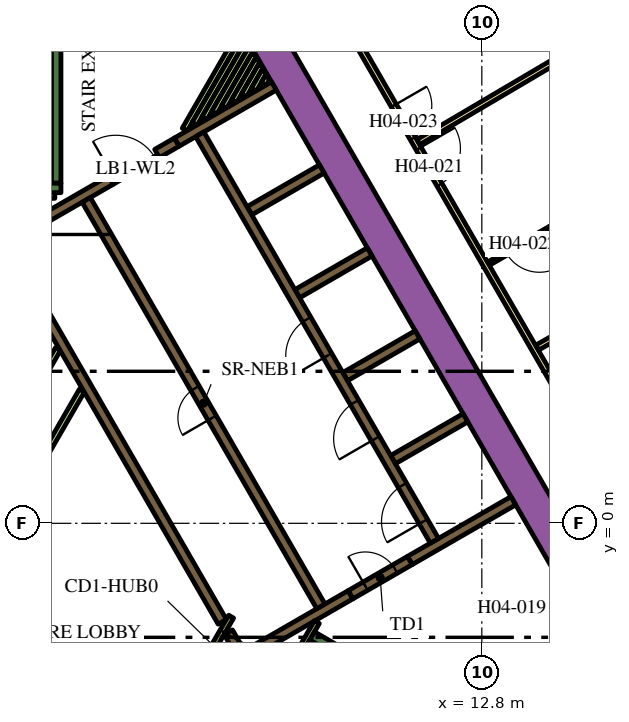
"""IFC4 building model, lengths in metres.
Left out: names, types, materials, properties, quantities, classifications, styles, units other than length and angle.
Written with IfcOpenShell. Run it as: python <this file> out.ifc"""

import sys

from ifc_helpers import new_model, si_unit, direction, frame, frame_2d, origin, place, context, subcontext, project, spatial, rectangle, extrude, element, fill, save


model = new_model("IFC4")
c1 = context("Model", 3, precision=1e-05, world=origin(), true_north=direction((0.0, 1.0)))
c2 = subcontext(c1, "Body", "Model", "MODEL_VIEW")
j1 = project(units=[si_unit("LENGTHUNIT", "METRE"), si_unit("PLANEANGLEUNIT", "RADIAN")], contexts=[c1])
p1 = place(None, origin())
s1 = spatial("IfcSite", under=j1, at=p1, CompositionType="ELEMENT")
p2 = place(p1, origin())
s2 = spatial("IfcBuilding", under=s1, at=p2, CompositionType="ELEMENT")
p3 = place(p2, frame((0.0, 0.0, 70.5)))
s3 = spatial("IfcBuildingStorey", under=s2, at=p3, CompositionType="ELEMENT", Elevation=70.5)
p4 = place(p3, frame((6.461, 13.909, 0.0), z_axis=(0.0, 0.0, 1.0), x_axis=(0.500005804227, -0.866022052686, 0.0)))
e1 = element("IfcWall", 1, at=p4, inside=s3, PredefinedType="SOLIDWALL", context=c2, shape_type="SweptSolid", body=[
    extrude(rectangle(XDim=20.834, YDim=0.9, at=frame_2d((10.417, 0.0))), origin(), (0.0, 0.0, 1.0), 3.9),
])
p5 = place(p3, frame((8.334, -2.964, 0.0), z_axis=(0.0, 0.0, 1.0), x_axis=(0.866016039709, -0.500016218704, 0.0)))
e2 = element("IfcWall", 2, at=p5, inside=s3, PredefinedType="SOLIDWALL", context=c2, shape_type="SweptSolid", body=[
    extrude(rectangle(XDim=7.05, YDim=0.25, at=frame_2d((3.525, 0.0))), origin(), (0.0, 0.0, 1.0), 3.9),
])
p6 = place(p3, frame((8.168, -3.503, 0.0), z_axis=(0.0, 0.0, 1.0), x_axis=(0.49972245349, 0.866185586049, 0.0)))
e3 = element("IfcWall", 3, at=p6, inside=s3, PredefinedType="SOLIDWALL", context=c2, shape_type="SweptSolid", body=[
    extrude(rectangle(XDim=0.425, YDim=0.25, at=frame_2d((0.212, 0.0))), origin(), (0.0, 0.0, 1.0), 3.9),
])
p7 = place(p3, frame((1.6, 8.95, 0.0), z_axis=(0.0, 0.0, 1.0), x_axis=(0.0, 1.0, 0.0)))
e4 = element("IfcWall", 4, at=p7, inside=s3, PredefinedType="SOLIDWALL", context=c2, shape_type="SweptSolid", body=[
    extrude(rectangle(XDim=6.8, YDim=0.25, at=frame_2d((3.4, 0.0))), origin(), (0.0, 0.0, 1.0), 3.9),
])
p8 = place(p3, frame((1.05, 8.825, 0.0), z_axis=(0.0, 0.0, 1.0), x_axis=(1.0, 0.0, 0.0)))
e5 = element("IfcWall", 5, at=p8, inside=s3, PredefinedType="SOLIDWALL", context=c2, shape_type="SweptSolid", body=[
    extrude(rectangle(XDim=0.675, YDim=0.25, at=frame_2d((0.337, 0.0))), origin(), (0.0, 0.0, 1.0), 3.9),
])
p9 = place(p3, frame((10.464, 1.677, 0.0), z_axis=(0.0, 0.0, 1.0), x_axis=(0.86605622881, 0.499946605688, 0.0)))
e6 = element("IfcWall", 6, at=p9, inside=s3, PredefinedType="SOLIDWALL", context=c2, shape_type="SweptSolid", body=[
    extrude(rectangle(XDim=2.2, YDim=0.25, at=frame_2d((1.1, 0.0))), origin(), (0.0, 0.0, 1.0), 3.9),
])
p10 = place(p3, frame((13.629, 0.594, 0.0), z_axis=(0.0, 0.0, 1.0), x_axis=(-0.86602790099, -0.499995674689, 0.0)))
e7 = element("IfcWall", 7, at=p10, inside=s3, PredefinedType="SOLIDWALL", context=c2, shape_type="SweptSolid", body=[
    extrude(rectangle(XDim=3.146, YDim=0.25, at=frame_2d((1.573, 0.0))), origin(), (0.0, 0.0, 1.0), 3.9),
])
p11 = place(p3, frame((9.346, -1.879, 0.0), z_axis=(0.0, 0.0, 1.0), x_axis=(-0.866048528039, -0.499959945477, 0.0)))
e8 = element("IfcWall", 8, at=p11, inside=s3, PredefinedType="SOLIDWALL", context=c2, shape_type="SweptSolid", body=[
    extrude(rectangle(XDim=3.47, YDim=0.25, at=frame_2d((1.735, 0.0))), origin(), (0.0, 0.0, 1.0), 3.9),
])
p12 = place(p3, frame((6.13, -2.867, 0.0), z_axis=(0.0, 0.0, 1.0), x_axis=(0.500160776593, -0.865932559475, 0.0)))
e9 = element("IfcWall", 9, at=p12, inside=s3, PredefinedType="SOLIDWALL", context=c2, shape_type="SweptSolid", body=[
    extrude(rectangle(XDim=0.627, YDim=0.25, at=frame_2d((0.313, 0.0))), origin(), (0.0, 0.0, 1.0), 3.9),
])
for number, where, z_axis, x_axis in (
    (10, (9.204, 3.859, 0.0), (0.0, 0.0, 1.0), (0.866, 0.5, 0.0)),
    (11, (7.944, 6.041, 0.0), (0.0, 0.0, 1.0), (0.866, 0.5, 0.0)),
    (12, (6.684, 8.224, 0.0), (0.0, 0.0, 1.0), (0.866, 0.5, 0.0)),
):
    element("IfcWall", number, at=place(p3, frame(where, z_axis=z_axis, x_axis=x_axis)), inside=s3, PredefinedType="SOLIDWALL", context=c2, shape_type="SweptSolid", body=[
        extrude(rectangle(XDim=2.2, YDim=0.25, at=frame_2d((1.1, 0.0))), origin(), (0.0, 0.0, 1.0), 3.9),
    ])
p13 = place(p3, frame((4.254, 9.731, 0.0), z_axis=(0.0, 0.0, 1.0), x_axis=(0.866056883327, 0.499945471869, 0.0)))
e13 = element("IfcWall", 13, at=p13, inside=s3, PredefinedType="SOLIDWALL", context=c2, shape_type="SweptSolid", body=[
    extrude(rectangle(XDim=0.6, YDim=0.25, at=frame_2d((0.3, 0.0))), origin(), (0.0, 0.0, 1.0), 3.9),
])
p14 = place(p3, frame((4.776, 10.032, 0.0), z_axis=(0.0, 0.0, 1.0), x_axis=(0.86600215702, 0.500040262416, 0.0)))
e14 = element("IfcWall", 14, at=p14, inside=s3, PredefinedType="SOLIDWALL", context=c2, shape_type="SweptSolid", body=[
    extrude(rectangle(XDim=2.948, YDim=0.25, at=frame_2d((1.474, 0.0))), origin(), (0.0, 0.0, 1.0), 3.9),
])
p15 = place(p3, frame((0.098, 7.331, 0.0), z_axis=(0.0, 0.0, 1.0), x_axis=(0.865988154826, 0.50006451154, 0.0)))
e15 = element("IfcWall", 15, at=p15, inside=s3, PredefinedType="SOLIDWALL", context=c2, shape_type="SweptSolid", body=[
    extrude(rectangle(XDim=3.398, YDim=0.25, at=frame_2d((1.699, 0.0))), origin(), (0.0, 0.0, 1.0), 3.9),
])
p16 = place(p3, frame((5.97, -2.591, 0.0), z_axis=(0.0, 0.0, 1.0), x_axis=(-0.499994469932, 0.866028596547, 0.0)))
e16 = element("IfcWall", 16, at=p16, inside=s3, PredefinedType="SOLIDWALL", context=c2, shape_type="SweptSolid", body=[
    extrude(rectangle(XDim=10.488, YDim=0.25, at=frame_2d((5.244, 0.0))), origin(), (0.0, 0.0, 1.0), 3.9),
])
p17 = place(p3, frame((8.459, -2.599, 0.0), z_axis=(0.0, 0.0, 1.0), x_axis=(-0.500041054325, -0.866001699761, 0.0)))
e17 = element("IfcWall", 17, at=p17, inside=s3, PredefinedType="PARTITIONING", context=c2, shape_type="SweptSolid", body=[
    extrude(rectangle(XDim=0.929, YDim=0.15, at=frame_2d((0.464, 0.0))), origin(), (0.0, 0.0, 1.0), 3.9),
])
p18 = place(p3, frame((-1.887, -3.718, 0.0), z_axis=(0.0, 0.0, 1.0), x_axis=(0.500005008002, 0.866022512394, 0.0)))
e18 = element("IfcWall", 18, at=p18, inside=s3, PredefinedType="PARTITIONING", context=c2, shape_type="SweptSolid", body=[
    extrude(rectangle(XDim=8.327, YDim=0.15, at=frame_2d((4.164, 0.0))), origin(), (0.0, 0.0, 1.0), 2.75),
])
p19 = place(p3, frame((-0.3, 1.212, 0.0), z_axis=(0.0, 0.0, 1.0), x_axis=(0.499963101113, 0.866046706318, 0.0)))
e19 = element("IfcWall", 19, at=p19, inside=s3, PredefinedType="PARTITIONING", context=c2, shape_type="SweptSolid", body=[
    extrude(rectangle(XDim=3.893, YDim=0.15, at=frame_2d((1.947, 0.0))), origin(), (0.0, 0.0, 1.0), 2.75),
])
p20 = place(p3, frame((1.05, 8.625, 0.0), z_axis=(0.0, 0.0, 1.0), x_axis=(1.0, 0.0, 0.0)))
e20 = element("IfcWall", 20, at=p20, inside=s3, PredefinedType="PARTITIONING", context=c2, shape_type="SweptSolid", body=[
    extrude(rectangle(XDim=0.514, YDim=0.15, at=frame_2d((0.257, 0.0))), origin(), (0.0, 0.0, 1.0), 2.75),
])
p21 = place(p3, frame((4.982, 10.359, 0.0), z_axis=(0.0, 0.0, 1.0), x_axis=(0.500051824031, 0.865995481099, 0.0)))
e21 = element("IfcWall", 21, at=p21, inside=s3, PredefinedType="PARTITIONING", context=c2, shape_type="SweptSolid", body=[
    extrude(rectangle(XDim=2.973, YDim=0.15, at=frame_2d((1.486, 0.0))), origin(), (0.0, 0.0, 1.0), 2.75),
])
p22 = place(p3, frame((5.242, 10.509, 0.0), z_axis=(0.0, 0.0, 1.0), x_axis=(0.499958506883, 0.866049358521, 0.0)))
e22 = element("IfcWall", 22, at=p22, inside=s3, PredefinedType="PARTITIONING", context=c2, shape_type="SweptSolid", body=[
    extrude(rectangle(XDim=2.626, YDim=0.15, at=frame_2d((1.313, 0.0))), origin(), (0.0, 0.0, 1.0), 2.75),
])
p23 = place(p3, frame((5.501, 10.659, 0.0), z_axis=(0.0, 0.0, 1.0), x_axis=(0.499951092774, 0.866053638543, 0.0)))
e23 = element("IfcWall", 23, at=p23, inside=s3, PredefinedType="PARTITIONING", context=c2, shape_type="SweptSolid", body=[
    extrude(rectangle(XDim=2.28, YDim=0.15, at=frame_2d((1.14, 0.0))), origin(), (0.0, 0.0, 1.0), 2.75),
])
p24 = place(p3, frame((5.761, 10.809, 0.0), z_axis=(0.0, 0.0, 1.0), x_axis=(0.499900985997, 0.866082561999, 0.0)))
e24 = element("IfcWall", 24, at=p24, inside=s3, PredefinedType="PARTITIONING", context=c2, shape_type="SweptSolid", body=[
    extrude(rectangle(XDim=1.934, YDim=0.15, at=frame_2d((0.967, 0.0))), origin(), (0.0, 0.0, 1.0), 2.75),
])
p25 = place(p3, frame((6.021, 10.959, 0.0), z_axis=(0.0, 0.0, 1.0), x_axis=(0.499944387978, 0.86605750902, 0.0)))
e25 = element("IfcWall", 25, at=p25, inside=s3, PredefinedType="PARTITIONING", context=c2, shape_type="SweptSolid", body=[
    extrude(rectangle(XDim=1.587, YDim=0.15, at=frame_2d((0.793, 0.0))), origin(), (0.0, 0.0, 1.0), 2.75),
])
p26 = place(p3, frame((6.281, 11.109, 0.0), z_axis=(0.0, 0.0, 1.0), x_axis=(0.500012022864, 0.866018462269, 0.0)))
e26 = element("IfcWall", 26, at=p26, inside=s3, PredefinedType="PARTITIONING", context=c2, shape_type="SweptSolid", body=[
    extrude(rectangle(XDim=1.241, YDim=0.15, at=frame_2d((0.62, 0.0))), origin(), (0.0, 0.0, 1.0), 2.75),
])
p27 = place(p3, frame((6.541, 11.259, 0.0), z_axis=(0.0, 0.0, 1.0), x_axis=(0.500132045864, 0.865949153646, 0.0)))
e27 = element("IfcWall", 27, at=p27, inside=s3, PredefinedType="PARTITIONING", context=c2, shape_type="SweptSolid", body=[
    extrude(rectangle(XDim=0.894, YDim=0.15, at=frame_2d((0.447, 0.0))), origin(), (0.0, 0.0, 1.0), 2.75),
])
p28 = place(p3, frame((6.8, 11.409, 0.0), z_axis=(0.0, 0.0, 1.0), x_axis=(0.500210807569, 0.865903659763, 0.0)))
e28 = element("IfcWall", 28, at=p28, inside=s3, PredefinedType="PARTITIONING", context=c2, shape_type="SweptSolid", body=[
    extrude(rectangle(XDim=0.548, YDim=0.15, at=frame_2d((0.274, 0.0))), origin(), (0.0, 0.0, 1.0), 2.75),
])
p29 = place(p3, frame((7.06, 11.559, 0.0), z_axis=(0.0, 0.0, 1.0), x_axis=(0.499267785915, 0.866447735266, 0.0)))
e29 = element("IfcWall", 29, at=p29, inside=s3, PredefinedType="PARTITIONING", context=c2, shape_type="SweptSolid", body=[
    extrude(rectangle(XDim=0.201, YDim=0.15, at=frame_2d((0.101, 0.0))), origin(), (0.0, 0.0, 1.0), 2.75),
])
p30 = place(p3, frame((11.553, -0.46, 0.0), z_axis=(0.0, 0.0, 1.0), x_axis=(-0.500006514828, 0.866021642414, 0.0)))
e30 = element("IfcWall", 30, at=p30, inside=s3, PredefinedType="SOLIDWALL", context=c2, shape_type="SweptSolid", body=[
    extrude(rectangle(XDim=12.35, YDim=0.25, at=frame_2d((6.175, 0.0))), origin(), (0.0, 0.0, 1.0), 3.9),
])
p31 = place(p30, frame((0.585, 0.0, 0.0)))
e31 = element("IfcOpeningElement", 31, at=p31, cuts=e30, PredefinedType="OPENING", context=c2, shape_type="SweptSolid", body=[
    extrude(rectangle(XDim=1.1, YDim=2.1, at=frame_2d((0.55, 1.05))), frame((0.0, 0.135, 0.0), z_axis=(0.0, -1.0, 0.0), x_axis=(1.0, 0.0, 0.0)), (0.0, 0.0, 1.0), 0.27),
])
p32 = place(p30, frame((3.105, 0.0, 0.0)))
e32 = element("IfcOpeningElement", 32, at=p32, cuts=e30, PredefinedType="OPENING", context=c2, shape_type="SweptSolid", body=[
    extrude(rectangle(XDim=1.1, YDim=2.1, at=frame_2d((0.55, 1.05))), frame((0.0, 0.135, 0.0), z_axis=(0.0, -1.0, 0.0), x_axis=(1.0, 0.0, 0.0)), (0.0, 0.0, 1.0), 0.27),
])
p33 = place(p30, frame((5.625, 0.0, 0.0)))
e33 = element("IfcOpeningElement", 33, at=p33, cuts=e30, PredefinedType="OPENING", context=c2, shape_type="SweptSolid", body=[
    extrude(rectangle(XDim=1.1, YDim=2.1, at=frame_2d((0.55, 1.05))), frame((0.0, 0.135, 0.0), z_axis=(0.0, -1.0, 0.0), x_axis=(1.0, 0.0, 0.0)), (0.0, 0.0, 1.0), 0.27),
])
p34 = place(p3, frame((8.565, -2.185, 0.0), z_axis=(0.0, 0.0, 1.0), x_axis=(-0.499997954832, 0.866026584559, 0.0)))
e34 = element("IfcWall", 34, at=p34, inside=s3, PredefinedType="SOLIDWALL", context=c2, shape_type="SweptSolid", body=[
    extrude(rectangle(XDim=12.35, YDim=0.25, at=frame_2d((6.175, 0.0))), origin(), (0.0, 0.0, 1.0), 3.9),
])
p35 = place(p34, frame((5.725, 0.0, 0.0)))
e35 = element("IfcOpeningElement", 35, at=p35, cuts=e34, PredefinedType="OPENING", context=c2, shape_type="SweptSolid", body=[
    extrude(rectangle(XDim=0.9, YDim=2.1, at=frame_2d((0.45, 1.05))), frame((0.0, 0.135, 0.0), z_axis=(0.0, -1.0, 0.0), x_axis=(1.0, 0.0, 0.0)), (0.0, 0.0, 1.0), 0.27),
])
p36 = place(p3, frame((9.346, -1.879, 0.0), z_axis=(0.0, 0.0, 1.0), x_axis=(0.866047807691, 0.499961193289, 0.0)))
e36 = element("IfcWall", 36, at=p36, inside=s3, PredefinedType="SOLIDWALL", context=c2, shape_type="SweptSolid", body=[
    extrude(rectangle(XDim=1.8, YDim=0.25, at=frame_2d((0.9, 0.0))), origin(), (0.0, 0.0, 1.0), 3.9),
])
p37 = place(p36, frame((0.45, 0.0, 0.0)))
e37 = element("IfcOpeningElement", 37, at=p37, cuts=e36, PredefinedType="OPENING", context=c2, shape_type="SweptSolid", body=[
    extrude(rectangle(XDim=0.9, YDim=2.1, at=frame_2d((0.45, 1.05))), frame((0.0, 0.135, 0.0), z_axis=(0.0, -1.0, 0.0), x_axis=(1.0, 0.0, 0.0)), (0.0, 0.0, 1.0), 0.27),
])
p38 = place(p3, frame((6.203, -2.456, 0.0), z_axis=(0.0, 0.0, 1.0), x_axis=(-0.500043961785, -0.866000020948, 0.0)))
e38 = element("IfcWall", 38, at=p38, inside=s3, PredefinedType="PARTITIONING", context=c2, shape_type="SweptSolid", body=[
    extrude(rectangle(XDim=1.95, YDim=0.15, at=frame_2d((0.975, 0.0))), origin(), (0.0, 0.0, 1.0), 3.9),
])
p39 = place(p38, frame((0.45, 0.0, 0.0)))
e39 = element("IfcOpeningElement", 39, at=p39, cuts=e38, PredefinedType="OPENING", context=c2, shape_type="SweptSolid", body=[
    extrude(rectangle(XDim=0.9, YDim=2.1, at=frame_2d((0.45, 1.05))), frame((0.0, 0.085, 0.0), z_axis=(0.0, -1.0, 0.0), x_axis=(1.0, 0.0, 0.0)), (0.0, 0.0, 1.0), 0.17),
])
p40 = place(p3, frame((3.081, 8.961, 0.0), z_axis=(0.0, 0.0, 1.0), x_axis=(0.866034573852, 0.49998411664, 0.0)))
e40 = element("IfcWall", 40, at=p40, inside=s3, PredefinedType="PARTITIONING", context=c2, shape_type="SweptSolid", body=[
    extrude(rectangle(XDim=1.4, YDim=0.09, at=frame_2d((0.7, 0.0))), origin(), (0.0, 0.0, 1.0), 2.75),
])
p41 = place(p40, frame((0.1, 0.0, 0.0)))
e41 = element("IfcOpeningElement", 41, at=p41, cuts=e40, PredefinedType="OPENING", context=c2, shape_type="SweptSolid", body=[
    extrude(rectangle(XDim=1.2, YDim=2.1, at=frame_2d((0.6, 1.05))), frame((0.0, 0.055, 0.0), z_axis=(0.0, -1.0, 0.0), x_axis=(1.0, 0.0, 0.0)), (0.0, 0.0, 1.0), 0.11),
])
p42 = place(p3, frame((6.163, 18.475, 0.0), z_axis=(0.0, 0.0, 1.0), x_axis=(0.500001317485, -0.866024643133, 0.0)))
e42 = element("IfcWall", 42, at=p42, inside=s3, PredefinedType="PARTITIONING", context=c2, shape_type="SweptSolid", body=[
    extrude(rectangle(XDim=25.767, YDim=0.15, at=frame_2d((12.883, 0.0))), origin(), (0.0, 0.0, 1.0), 2.75),
])
p43 = place(p42, frame((21.138, 0.0, 0.0)))
e43 = element("IfcOpeningElement", 43, at=p43, cuts=e42, PredefinedType="OPENING", context=c2, shape_type="SweptSolid", body=[
    extrude(rectangle(XDim=1.0, YDim=2.1, at=frame_2d((0.5, 1.05))), frame((0.0, 0.085, 0.0), z_axis=(0.0, -1.0, 0.0), x_axis=(1.0, 0.0, 0.0)), (0.0, 0.0, 1.0), 0.17),
])
p44 = place(p42, frame((9.948, 0.0, 0.0)))
e44 = element("IfcOpeningElement", 44, at=p44, cuts=e42, PredefinedType="OPENING", context=c2, shape_type="SweptSolid", body=[
    extrude(rectangle(XDim=1.1, YDim=2.1, at=frame_2d((0.55, 1.05))), frame((0.0, 0.085, 0.0), z_axis=(0.0, -1.0, 0.0), x_axis=(1.0, 0.0, 0.0)), (0.0, 0.0, 1.0), 0.17),
])
p45 = place(p42, frame((8.641, 0.0, 0.0)))
e45 = element("IfcOpeningElement", 45, at=p45, cuts=e42, PredefinedType="OPENING", context=c2, shape_type="SweptSolid", body=[
    extrude(rectangle(XDim=1.0, YDim=2.1, at=frame_2d((0.5, 1.05))), frame((0.0, 0.085, 0.0), z_axis=(0.0, -1.0, 0.0), x_axis=(1.0, 0.0, 0.0)), (0.0, 0.0, 1.0), 0.17),
])
p46 = place(p42, frame((0.18, 0.0, 0.0)))
e46 = element("IfcOpeningElement", 46, at=p46, cuts=e42, PredefinedType="OPENING", context=c2, shape_type="SweptSolid", body=[
    extrude(rectangle(XDim=1.0, YDim=2.1, at=frame_2d((0.5, 1.05))), frame((0.0, 0.085, 0.0), z_axis=(0.0, -1.0, 0.0), x_axis=(1.0, 0.0, 0.0)), (0.0, 0.0, 1.0), 0.17),
])
p47 = place(p3, frame((17.856, 13.999, 0.0), z_axis=(0.0, 0.0, 1.0), x_axis=(-0.861371519381, -0.507975497047, 0.0)))
e47 = element("IfcWall", 47, at=p47, inside=s3, PredefinedType="PARTITIONING", context=c2, shape_type="SweptSolid", body=[
    extrude(rectangle(XDim=7.804, YDim=0.15, at=frame_2d((3.902, 0.0))), origin(), (0.0, 0.0, 1.0), 2.75),
])
p48 = place(p3, frame((21.052, 8.464, 0.0), z_axis=(0.0, 0.0, 1.0), x_axis=(-0.87059371954, -0.492002617368, 0.0)))
e48 = element("IfcWall", 48, at=p48, inside=s3, PredefinedType="PARTITIONING", context=c2, shape_type="SweptSolid", body=[
    extrude(rectangle(XDim=7.803, YDim=0.15, at=frame_2d((3.902, 0.0))), origin(), (0.0, 0.0, 1.0), 2.75),
])
p49 = place(p3, frame((15.397, 8.231, 0.0), z_axis=(0.0, 0.0, 1.0), x_axis=(-0.866018616679, -0.500011755427, 0.0)))
e49 = element("IfcWall", 49, at=p49, inside=s3, PredefinedType="PARTITIONING", context=c2, shape_type="SweptSolid", body=[
    extrude(rectangle(XDim=2.8, YDim=0.1, at=frame_2d((1.4, 0.0))), origin(), (0.0, 0.0, 1.0), 2.75),
])
p50 = place(p49, frame((1.25, 0.0, 0.0)))
e50 = element("IfcOpeningElement", 50, at=p50, cuts=e49, PredefinedType="OPENING", context=c2, shape_type="SweptSolid", body=[
    extrude(rectangle(XDim=1.0, YDim=2.1, at=frame_2d((0.5, 1.05))), frame((0.0, 0.06, 0.0), z_axis=(0.0, -1.0, 0.0), x_axis=(1.0, 0.0, 0.0)), (0.0, 0.0, 1.0), 0.12),
])
p51 = place(p31, origin())
e51 = element("IfcDoor", 51, at=p51, inside=s3, OperationType="DOUBLE_DOOR_SLIDING", PredefinedType="DOOR", context=c2, shape_type="SweptSolid", body=[
    extrude(rectangle(XDim=1.1, YDim=2.1, at=frame_2d((0.55, 1.05))), frame((0.0, 0.025, 0.0), z_axis=(0.0, -1.0, 0.0), x_axis=(1.0, 0.0, 0.0)), (0.0, 0.0, 1.0), 0.05),
])
fill(e31, e51)
p52 = place(p32, origin())
e52 = element("IfcDoor", 52, at=p52, inside=s3, OperationType="DOUBLE_DOOR_SLIDING", PredefinedType="DOOR", context=c2, shape_type="SweptSolid", body=[
    extrude(rectangle(XDim=1.1, YDim=2.1, at=frame_2d((0.55, 1.05))), frame((0.0, 0.025, 0.0), z_axis=(0.0, -1.0, 0.0), x_axis=(1.0, 0.0, 0.0)), (0.0, 0.0, 1.0), 0.05),
])
fill(e32, e52)
p53 = place(p33, origin())
e53 = element("IfcDoor", 53, at=p53, inside=s3, OperationType="DOUBLE_DOOR_SLIDING", PredefinedType="DOOR", context=c2, shape_type="SweptSolid", body=[
    extrude(rectangle(XDim=1.1, YDim=2.1, at=frame_2d((0.55, 1.05))), frame((0.0, 0.025, 0.0), z_axis=(0.0, -1.0, 0.0), x_axis=(1.0, 0.0, 0.0)), (0.0, 0.0, 1.0), 0.05),
])
fill(e33, e53)
p54 = place(p35, origin())
e54 = element("IfcDoor", 54, at=p54, inside=s3, OperationType="SINGLE_SWING_LEFT", PredefinedType="DOOR", context=c2, shape_type="SweptSolid", body=[
    extrude(rectangle(XDim=0.9, YDim=2.1, at=frame_2d((0.45, 1.05))), frame((0.0, 0.025, 0.0), z_axis=(0.0, -1.0, 0.0), x_axis=(1.0, 0.0, 0.0)), (0.0, 0.0, 1.0), 0.05),
])
fill(e35, e54)
p55 = place(p37, origin())
e55 = element("IfcDoor", 55, at=p55, inside=s3, OperationType="SINGLE_SWING_LEFT", PredefinedType="DOOR", context=c2, shape_type="SweptSolid", body=[
    extrude(rectangle(XDim=0.9, YDim=2.1, at=frame_2d((0.45, 1.05))), frame((0.0, 0.025, 0.0), z_axis=(0.0, -1.0, 0.0), x_axis=(1.0, 0.0, 0.0)), (0.0, 0.0, 1.0), 0.05),
])
fill(e37, e55)
p56 = place(p39, origin())
e56 = element("IfcDoor", 56, at=p56, inside=s3, OperationType="SINGLE_SWING_LEFT", PredefinedType="DOOR", context=c2, shape_type="SweptSolid", body=[
    extrude(rectangle(XDim=0.9, YDim=2.1, at=frame_2d((0.45, 1.05))), frame((0.0, 0.025, 0.0), z_axis=(0.0, -1.0, 0.0), x_axis=(1.0, 0.0, 0.0)), (0.0, 0.0, 1.0), 0.05),
])
fill(e39, e56)
p57 = place(p41, origin())
e57 = element("IfcDoor", 57, at=p57, inside=s3, OperationType="SINGLE_SWING_LEFT", PredefinedType="DOOR", context=c2, shape_type="SweptSolid", body=[
    extrude(rectangle(XDim=1.2, YDim=2.1, at=frame_2d((0.6, 1.05))), frame((0.0, 0.025, 0.0), z_axis=(0.0, -1.0, 0.0), x_axis=(1.0, 0.0, 0.0)), (0.0, 0.0, 1.0), 0.05),
])
fill(e41, e57)
p58 = place(p44, origin())
e58 = element("IfcDoor", 58, at=p58, inside=s3, OperationType="SINGLE_SWING_LEFT", PredefinedType="DOOR", context=c2, shape_type="SweptSolid", body=[
    extrude(rectangle(XDim=1.1, YDim=2.1, at=frame_2d((0.55, 1.05))), frame((0.0, 0.025, 0.0), z_axis=(0.0, -1.0, 0.0), x_axis=(1.0, 0.0, 0.0)), (0.0, 0.0, 1.0), 0.05),
])
fill(e44, e58)
p59 = place(p50, origin())
e59 = element("IfcDoor", 59, at=p59, inside=s3, OperationType="SINGLE_SWING_LEFT", PredefinedType="DOOR", context=c2, shape_type="SweptSolid", body=[
    extrude(rectangle(XDim=1.0, YDim=2.1, at=frame_2d((0.5, 1.05))), frame((0.0, 0.025, 0.0), z_axis=(0.0, -1.0, 0.0), x_axis=(1.0, 0.0, 0.0)), (0.0, 0.0, 1.0), 0.05),
])
fill(e50, e59)
p60 = place(p45, origin())
e60 = element("IfcDoor", 60, at=p60, inside=s3, OperationType="SINGLE_SWING_RIGHT", PredefinedType="DOOR", context=c2, shape_type="SweptSolid", body=[
    extrude(rectangle(XDim=1.0, YDim=2.1, at=frame_2d((0.5, 1.05))), frame((0.0, 0.025, 0.0), z_axis=(0.0, -1.0, 0.0), x_axis=(1.0, 0.0, 0.0)), (0.0, 0.0, 1.0), 0.05),
])
fill(e45, e60)
save(model, sys.argv[1])
